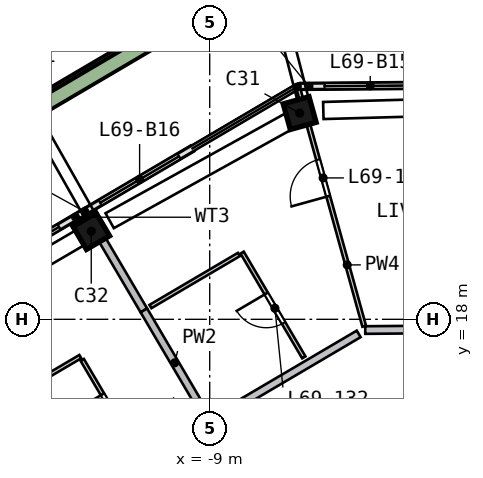
"""IFC4 building model, lengths in metres.
Left out: names, types, materials, properties, quantities, classifications, styles, units other than length and angle.
Written with IfcOpenShell. Run it as: python <this file> out.ifc"""

import sys

from ifc_helpers import new_model, si_unit, direction, frame, frame_2d, origin, origin_2d, place, context, subcontext, project, spatial, rectangle, extrude, element, fill, save


model = new_model("IFC4")
c1 = context("Model", 3, precision=1e-05, world=origin(), true_north=direction((0.0, 1.0)))
c2 = subcontext(c1, "Body", "Model", "MODEL_VIEW")
j1 = project(units=[si_unit("LENGTHUNIT", "METRE"), si_unit("PLANEANGLEUNIT", "RADIAN")], contexts=[c1])
p1 = place(None, origin())
s1 = spatial("IfcSite", under=j1, at=p1, CompositionType="ELEMENT")
p2 = place(p1, origin())
s2 = spatial("IfcBuilding", under=s1, at=p2, CompositionType="ELEMENT")
p3 = place(p2, frame((0.0, 0.0, 281.0)))
s3 = spatial("IfcBuildingStorey", under=s2, at=p3, CompositionType="ELEMENT", Elevation=281.0)
p4 = place(p3, frame((-6.499, 23.465, 0.0), z_axis=(-0.111293516, -0.031776427, 0.993279423), x_axis=(0.95739256, 0.264583542, 0.115736922)))
e1 = element("IfcColumn", 1, at=p4, inside=s3, PredefinedType="COLUMN", context=c2, shape_type="SweptSolid", body=[
    extrude(rectangle(XDim=0.7, YDim=0.7, at=origin_2d()), origin(), (0.0, 0.0, 1.0), 3.211),
])
p5 = place(p3, frame((-12.0, 20.389, 0.0), z_axis=(-0.096505009, -0.057948635, 0.993644171), x_axis=(-0.856175349, -0.504275135, -0.112562695)))
e2 = element("IfcColumn", 2, at=p5, inside=s3, PredefinedType="COLUMN", context=c2, shape_type="SweptSolid", body=[
    extrude(rectangle(XDim=0.7, YDim=0.7, at=origin_2d()), origin(), (0.0, 0.0, 1.0), 3.21),
])
p6 = place(p3, frame((-3.176, 24.157, 0.0), z_axis=(0.0, 0.0, 1.0), x_axis=(-0.99996526, -0.008335419, 0.0)))
e3 = element("IfcWall", 3, at=p6, inside=s3, PredefinedType="SOLIDWALL", context=c2, shape_type="SweptSolid", body=[
    extrude(rectangle(XDim=3.427, YDim=0.15, at=frame_2d((1.713, 0.0))), origin(), (0.0, 0.0, 1.0), 2.525),
])
p7 = place(p6, frame((0.4, 0.0, 0.0)))
e4 = element("IfcOpeningElement", 4, at=p7, cuts=e3, PredefinedType="OPENING", context=c2, shape_type="SweptSolid", body=[
    extrude(rectangle(XDim=2.4, YDim=2.4, at=frame_2d((1.2, 1.2))), frame((0.0, 0.085, 0.0), z_axis=(0.0, -1.0, 0.0), x_axis=(1.0, 0.0, 0.0)), (0.0, 0.0, 1.0), 0.17),
])
p8 = place(p3, frame((-9.466, 22.49, 0.0), z_axis=(0.0, 0.0, 1.0), x_axis=(-0.861810594, -0.507230224, 0.0)))
e5 = element("IfcWall", 5, at=p8, inside=s3, PredefinedType="SOLIDWALL", context=c2, shape_type="SweptSolid", body=[
    extrude(rectangle(XDim=3.25, YDim=0.15, at=frame_2d((1.625, 0.0))), origin(), (0.0, 0.0, 1.0), 2.525),
])
p9 = place(p8, frame((0.4, 0.0, 0.0)))
e6 = element("IfcOpeningElement", 6, at=p9, cuts=e5, PredefinedType="OPENING", context=c2, shape_type="SweptSolid", body=[
    extrude(rectangle(XDim=2.4, YDim=2.4, at=frame_2d((1.2, 1.2))), frame((0.0, 0.085, 0.0), z_axis=(0.0, -1.0, 0.0), x_axis=(1.0, 0.0, 0.0)), (0.0, 0.0, 1.0), 0.17),
])
p10 = place(p3, frame((-12.267, 20.841, 0.0), z_axis=(0.0, 0.0, 1.0), x_axis=(-0.8618108, -0.507229874, 0.0)))
e7 = element("IfcWall", 7, at=p10, inside=s3, PredefinedType="SOLIDWALL", context=c2, shape_type="SweptSolid", body=[
    extrude(rectangle(XDim=3.611, YDim=0.15, at=frame_2d((1.806, 0.0))), origin(), (0.0, 0.0, 1.0), 2.525),
])
p11 = place(p10, frame((0.811, 0.0, 0.0)))
e8 = element("IfcOpeningElement", 8, at=p11, cuts=e7, PredefinedType="OPENING", context=c2, shape_type="SweptSolid", body=[
    extrude(rectangle(XDim=2.4, YDim=2.4, at=frame_2d((1.2, 1.2))), frame((0.0, 0.085, 0.0), z_axis=(0.0, -1.0, 0.0), x_axis=(1.0, 0.0, 0.0)), (0.0, 0.0, 1.0), 0.17),
])
p12 = place(p3, frame((-7.576, 27.112, 0.0), z_axis=(0.0, 0.0, 1.0), x_axis=(-0.86180888, -0.507233136, 0.0)))
e9 = element("IfcWall", 9, at=p12, inside=s3, PredefinedType="SOLIDWALL", context=c2, shape_type="SweptSolid", body=[
    extrude(rectangle(XDim=13.723, YDim=0.5, at=frame_2d((6.862, 0.0))), origin(), (0.0, 0.0, 1.0), 0.7),
])
p13 = place(p3, frame((-12.936, 12.992, 0.0), z_axis=(0.0, 0.0, 1.0), x_axis=(0.861805451, 0.507238962, 0.0)))
e10 = element("IfcWall", 10, at=p13, inside=s3, PredefinedType="SOLIDWALL", context=c2, shape_type="SweptSolid", body=[
    extrude(rectangle(XDim=9.116, YDim=0.2, at=frame_2d((4.558, 0.0))), origin(), (0.0, 0.0, 1.0), 3.19),
])
p14 = place(p13, frame((3.05, 0.0, 0.0)))
e11 = element("IfcOpeningElement", 11, at=p14, cuts=e10, PredefinedType="OPENING", context=c2, shape_type="SweptSolid", body=[
    extrude(rectangle(XDim=1.0, YDim=2.1, at=frame_2d((0.5, 1.05))), frame((0.0, 0.11, 0.0), z_axis=(0.0, -1.0, 0.0), x_axis=(1.0, 0.0, 0.0)), (0.0, 0.0, 1.0), 0.22),
])
p15 = place(p3, frame((-4.907, 17.718, 0.0), z_axis=(0.0, 0.0, 1.0), x_axis=(0.999964838, 0.008385889, 0.0)))
e12 = element("IfcWall", 12, at=p15, inside=s3, PredefinedType="SOLIDWALL", context=c2, shape_type="SweptSolid", body=[
    extrude(rectangle(XDim=9.316, YDim=0.2, at=frame_2d((4.658, 0.0))), origin(), (0.0, 0.0, 1.0), 3.19),
])
p16 = place(p15, frame((1.9, 0.0, 0.0)))
e13 = element("IfcOpeningElement", 13, at=p16, cuts=e12, PredefinedType="OPENING", context=c2, shape_type="SweptSolid", body=[
    extrude(rectangle(XDim=1.0, YDim=2.1, at=frame_2d((0.5, 1.05))), frame((0.0, 0.11, 0.0), z_axis=(0.0, -1.0, 0.0), x_axis=(1.0, 0.0, 0.0)), (0.0, 0.0, 1.0), 0.22),
])
p17 = place(p3, frame((-10.732, 18.234, 0.0), z_axis=(0.0, 0.0, 1.0), x_axis=(-0.50724797, 0.861800149, 0.0)))
e14 = element("IfcWall", 14, at=p17, inside=s3, PredefinedType="SOLIDWALL", context=c2, shape_type="SweptSolid", body=[
    extrude(rectangle(XDim=2.95, YDim=0.2, at=frame_2d((1.475, 0.0))), origin(), (0.0, 0.0, 1.0), 3.19),
])
p18 = place(p3, frame((-9.109, 15.477, 0.0), z_axis=(0.0, 0.0, 1.0), x_axis=(-0.507263495, 0.861791011, 0.0)))
e15 = element("IfcWall", 15, at=p18, inside=s3, PredefinedType="SOLIDWALL", context=c2, shape_type="SweptSolid", body=[
    extrude(rectangle(XDim=3.2, YDim=0.2, at=frame_2d((1.6, 0.0))), origin(), (0.0, 0.0, 1.0), 3.19),
])
p19 = place(p3, frame((-15.292, 15.319, 0.0), z_axis=(0.0, 0.0, 1.0), x_axis=(0.861789934, 0.507265325, 0.0)))
e16 = element("IfcWall", 16, at=p19, inside=s3, PredefinedType="PARTITIONING", context=c2, shape_type="SweptSolid", body=[
    extrude(rectangle(XDim=3.35, YDim=0.1, at=frame_2d((1.675, 0.0))), origin(), (0.0, 0.0, 1.0), 3.19),
])
p20 = place(p3, frame((-10.883, 14.433, 0.0), z_axis=(0.0, 0.0, 1.0), x_axis=(-0.507222463, 0.861815162, 0.0)))
e17 = element("IfcWall", 17, at=p20, inside=s3, PredefinedType="PARTITIONING", context=c2, shape_type="SweptSolid", body=[
    extrude(rectangle(XDim=2.9, YDim=0.1, at=frame_2d((1.45, 0.0))), origin(), (0.0, 0.0, 1.0), 3.19),
])
p21 = place(p20, frame((0.95, 0.0, 0.0)))
e18 = element("IfcOpeningElement", 18, at=p21, cuts=e17, PredefinedType="OPENING", context=c2, shape_type="SweptSolid", body=[
    extrude(rectangle(XDim=0.9, YDim=2.1, at=frame_2d((0.45, 1.05))), frame((0.0, 0.06, 0.0), z_axis=(0.0, -1.0, 0.0), x_axis=(1.0, 0.0, 0.0)), (0.0, 0.0, 1.0), 0.12),
])
p22 = place(p3, frame((-8.233, 19.705, 0.0), z_axis=(0.0, 0.0, 1.0), x_axis=(-0.861771448, -0.507296729, 0.0)))
e19 = element("IfcWall", 19, at=p22, inside=s3, PredefinedType="PARTITIONING", context=c2, shape_type="SweptSolid", body=[
    extrude(rectangle(XDim=2.7, YDim=0.1, at=frame_2d((1.35, 0.0))), origin(), (0.0, 0.0, 1.0), 3.19),
])
p23 = place(p3, frame((-6.524, 16.998, 0.0), z_axis=(0.0, 0.0, 1.0), x_axis=(-0.507263495, 0.861791011, 0.0)))
e20 = element("IfcWall", 20, at=p23, inside=s3, PredefinedType="PARTITIONING", context=c2, shape_type="SweptSolid", body=[
    extrude(rectangle(XDim=3.2, YDim=0.1, at=frame_2d((1.6, 0.0))), origin(), (0.0, 0.0, 1.0), 3.19),
])
p24 = place(p23, frame((1.05, 0.0, 0.0)))
e21 = element("IfcOpeningElement", 21, at=p24, cuts=e20, PredefinedType="OPENING", context=c2, shape_type="SweptSolid", body=[
    extrude(rectangle(XDim=0.9, YDim=2.1, at=frame_2d((0.45, 1.05))), frame((0.0, 0.06, 0.0), z_axis=(0.0, -1.0, 0.0), x_axis=(1.0, 0.0, 0.0)), (0.0, 0.0, 1.0), 0.12),
])
p25 = place(p3, frame((-4.935, 17.818, 0.0), z_axis=(0.0, 0.0, 1.0), x_axis=(-0.266914636, 0.963720176, 0.0)))
e22 = element("IfcWall", 22, at=p25, inside=s3, PredefinedType="PARTITIONING", context=c2, shape_type="SweptSolid", body=[
    extrude(rectangle(XDim=6.476, YDim=0.1, at=frame_2d((3.238, 0.0))), origin(), (0.0, 0.0, 1.0), 3.19),
])
p26 = place(p25, frame((3.55, 0.0, 0.0)))
e23 = element("IfcOpeningElement", 23, at=p26, cuts=e22, PredefinedType="OPENING", context=c2, shape_type="SweptSolid", body=[
    extrude(rectangle(XDim=1.0, YDim=2.1, at=frame_2d((0.5, 1.05))), frame((0.0, 0.06, 0.0), z_axis=(0.0, -1.0, 0.0), x_axis=(1.0, 0.0, 0.0)), (0.0, 0.0, 1.0), 0.12),
])
p27 = place(p7, origin())
e24 = element("IfcDoor", 24, at=p27, inside=s3, OperationType="SLIDING_TO_RIGHT", PredefinedType="DOOR", context=c2, shape_type="SweptSolid", body=[
    extrude(rectangle(XDim=2.4, YDim=2.4, at=frame_2d((1.2, 1.2))), frame((0.0, 0.025, 0.0), z_axis=(0.0, -1.0, 0.0), x_axis=(1.0, 0.0, 0.0)), (0.0, 0.0, 1.0), 0.05),
])
fill(e4, e24)
p28 = place(p9, origin())
e25 = element("IfcDoor", 25, at=p28, inside=s3, OperationType="SLIDING_TO_RIGHT", PredefinedType="DOOR", context=c2, shape_type="SweptSolid", body=[
    extrude(rectangle(XDim=2.4, YDim=2.4, at=frame_2d((1.2, 1.2))), frame((0.0, 0.025, 0.0), z_axis=(0.0, -1.0, 0.0), x_axis=(1.0, 0.0, 0.0)), (0.0, 0.0, 1.0), 0.05),
])
fill(e6, e25)
p29 = place(p11, origin())
e26 = element("IfcDoor", 26, at=p29, inside=s3, OperationType="SLIDING_TO_LEFT", PredefinedType="DOOR", context=c2, shape_type="SweptSolid", body=[
    extrude(rectangle(XDim=2.4, YDim=2.4, at=frame_2d((1.2, 1.2))), frame((0.0, 0.025, 0.0), z_axis=(0.0, -1.0, 0.0), x_axis=(1.0, 0.0, 0.0)), (0.0, 0.0, 1.0), 0.05),
])
fill(e8, e26)
p30 = place(p26, origin())
e27 = element("IfcDoor", 27, at=p30, inside=s3, OperationType="SINGLE_SWING_LEFT", PredefinedType="DOOR", context=c2, shape_type="SweptSolid", body=[
    extrude(rectangle(XDim=1.0, YDim=2.1, at=frame_2d((0.5, 1.05))), frame((0.0, 0.025, 0.0), z_axis=(0.0, -1.0, 0.0), x_axis=(1.0, 0.0, 0.0)), (0.0, 0.0, 1.0), 0.05),
])
fill(e23, e27)
p31 = place(p24, origin())
e28 = element("IfcDoor", 28, at=p31, inside=s3, OperationType="SINGLE_SWING_RIGHT", PredefinedType="DOOR", context=c2, shape_type="SweptSolid", body=[
    extrude(rectangle(XDim=0.9, YDim=2.1, at=frame_2d((0.45, 1.05))), frame((0.0, 0.025, 0.0), z_axis=(0.0, -1.0, 0.0), x_axis=(1.0, 0.0, 0.0)), (0.0, 0.0, 1.0), 0.05),
])
fill(e21, e28)
p32 = place(p21, origin())
e29 = element("IfcDoor", 29, at=p32, inside=s3, OperationType="SINGLE_SWING_RIGHT", PredefinedType="DOOR", context=c2, shape_type="SweptSolid", body=[
    extrude(rectangle(XDim=0.9, YDim=2.1, at=frame_2d((0.45, 1.05))), frame((0.0, 0.025, 0.0), z_axis=(0.0, -1.0, 0.0), x_axis=(1.0, 0.0, 0.0)), (0.0, 0.0, 1.0), 0.05),
])
fill(e18, e29)
save(model, sys.argv[1])
